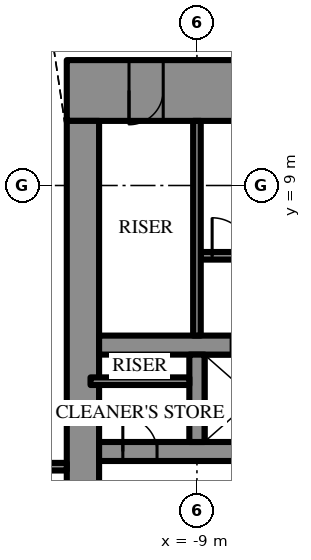
"""IFC4 building model, lengths in metres.
Left out: names, types, materials, properties, quantities, classifications, styles, units other than length and angle.
Written with IfcOpenShell. Run it as: python <this file> out.ifc"""

import sys

from ifc_helpers import new_model, si_unit, direction, frame, frame_2d, origin, place, context, subcontext, project, spatial, rectangle, extrude, element, fill, save


model = new_model("IFC4")
c1 = context("Model", 3, precision=1e-05, world=origin(), true_north=direction((0.0, 1.0)))
c2 = subcontext(c1, "Body", "Model", "MODEL_VIEW")
j1 = project(units=[si_unit("LENGTHUNIT", "METRE"), si_unit("PLANEANGLEUNIT", "RADIAN")], contexts=[c1])
p1 = place(None, origin())
s1 = spatial("IfcSite", under=j1, at=p1, CompositionType="ELEMENT")
p2 = place(p1, origin())
s2 = spatial("IfcBuilding", under=s1, at=p2, CompositionType="ELEMENT")
p3 = place(p2, frame((0.0, 0.0, 387.1)))
s3 = spatial("IfcBuildingStorey", under=s2, at=p3, CompositionType="ELEMENT", Elevation=387.1)
p4 = place(p3, frame((-12.425, 11.5, 0.0), z_axis=(0.0, 0.0, 1.0), x_axis=(1.0, 0.0, 0.0)))
e1 = element("IfcWall", 1, at=p4, inside=s3, PredefinedType="SHEAR", context=c2, shape_type="SweptSolid", body=[
    extrude(rectangle(XDim=24.85, YDim=1.6, at=frame_2d((12.425, 0.0))), origin(), (0.0, 0.0, 1.0), 4.2),
])
p5 = place(p4, frame((13.275, 0.0, 0.0)))
e2 = element("IfcOpeningElement", 2, at=p5, cuts=e1, PredefinedType="OPENING", context=c2, shape_type="SweptSolid", body=[
    extrude(rectangle(XDim=0.9, YDim=2.2, at=frame_2d((0.45, 1.1))), frame((0.0, 0.81, 0.0), z_axis=(0.0, -1.0, 0.0), x_axis=(1.0, 0.0, 0.0)), (0.0, 0.0, 1.0), 1.62),
])
p6 = place(p4, frame((16.275, 0.0, 0.0)))
e3 = element("IfcOpeningElement", 3, at=p6, cuts=e1, PredefinedType="OPENING", context=c2, shape_type="SweptSolid", body=[
    extrude(rectangle(XDim=0.9, YDim=2.2, at=frame_2d((0.45, 1.1))), frame((0.0, 0.81, 0.0), z_axis=(0.0, -1.0, 0.0), x_axis=(1.0, 0.0, 0.0)), (0.0, 0.0, 1.0), 1.62),
])
p7 = place(p4, frame((19.325, 0.0, 0.0)))
e4 = element("IfcOpeningElement", 4, at=p7, cuts=e1, PredefinedType="OPENING", context=c2, shape_type="SweptSolid", body=[
    extrude(rectangle(XDim=1.0, YDim=2.2, at=frame_2d((0.5, 1.1))), frame((0.0, 0.81, 0.0), z_axis=(0.0, -1.0, 0.0), x_axis=(1.0, 0.0, 0.0)), (0.0, 0.0, 1.0), 1.62),
])
p8 = place(p4, frame((1.637, 0.0, 0.0)))
e5 = element("IfcOpeningElement", 5, at=p8, cuts=e1, PredefinedType="OPENING", context=c2, shape_type="SweptSolid", body=[
    extrude(rectangle(XDim=0.9, YDim=2.2, at=frame_2d((0.45, 1.1))), frame((0.0, 0.81, 0.0), z_axis=(0.0, -1.0, 0.0), x_axis=(1.0, 0.0, 0.0)), (0.0, 0.0, 1.0), 1.62),
])
p9 = place(p4, frame((22.312, 0.0, 0.0)))
e6 = element("IfcOpeningElement", 6, at=p9, cuts=e1, PredefinedType="OPENING", context=c2, shape_type="SweptSolid", body=[
    extrude(rectangle(XDim=0.9, YDim=2.2, at=frame_2d((0.45, 1.1))), frame((0.0, 0.81, 0.0), z_axis=(0.0, -1.0, 0.0), x_axis=(1.0, 0.0, 0.0)), (0.0, 0.0, 1.0), 1.62),
])
p10 = place(p3, frame((-12.0, 10.7, 0.0), z_axis=(0.0, 0.0, 1.0), x_axis=(0.0, -1.0, 0.0)))
e7 = element("IfcWall", 7, at=p10, inside=s3, PredefinedType="SHEAR", context=c2, shape_type="SweptSolid", body=[
    extrude(rectangle(XDim=21.4, YDim=0.85, at=frame_2d((10.7, 0.0))), origin(), (0.0, 0.0, 1.0), 4.2),
])
p11 = place(p10, frame((9.8, 0.0, 0.0)))
e8 = element("IfcOpeningElement", 8, at=p11, cuts=e7, PredefinedType="OPENING", context=c2, shape_type="SweptSolid", body=[
    extrude(rectangle(XDim=1.8, YDim=2.4, at=frame_2d((0.9, 1.2))), frame((0.0, 0.435, 0.0), z_axis=(0.0, -1.0, 0.0), x_axis=(1.0, 0.0, 0.0)), (0.0, 0.0, 1.0), 0.87),
])
p12 = place(p3, frame((-11.575, 2.0, 0.0), z_axis=(0.0, 0.0, 1.0), x_axis=(1.0, 0.0, 0.0)))
e9 = element("IfcWall", 9, at=p12, inside=s3, PredefinedType="SHEAR", context=c2, shape_type="SweptSolid", body=[
    extrude(rectangle(XDim=5.775, YDim=0.5, at=frame_2d((2.887, 0.0))), origin(), (0.0, 0.0, 1.0), 4.2),
])
p13 = place(p12, frame((0.625, 0.0, 0.0)))
e10 = element("IfcOpeningElement", 10, at=p13, cuts=e9, PredefinedType="OPENING", context=c2, shape_type="SweptSolid", body=[
    extrude(rectangle(XDim=0.9, YDim=2.2, at=frame_2d((0.45, 1.1))), frame((0.0, 0.26, 0.0), z_axis=(0.0, -1.0, 0.0), x_axis=(1.0, 0.0, 0.0)), (0.0, 0.0, 1.0), 0.52),
])
p14 = place(p3, frame((-11.575, 4.8, 0.0), z_axis=(0.0, 0.0, 1.0), x_axis=(1.0, 0.0, 0.0)))
e11 = element("IfcWall", 11, at=p14, inside=s3, PredefinedType="SHEAR", context=c2, shape_type="SweptSolid", body=[
    extrude(rectangle(XDim=23.15, YDim=0.5, at=frame_2d((11.575, 0.0))), origin(), (0.0, 0.0, 1.0), 4.2),
])
p15 = place(p14, frame((6.475, 0.0, 0.0)))
e12 = element("IfcOpeningElement", 12, at=p15, cuts=e11, PredefinedType="OPENING", context=c2, shape_type="SweptSolid", body=[
    extrude(rectangle(XDim=1.2, YDim=2.2, at=frame_2d((0.6, 1.1))), frame((0.0, 0.26, 0.0), z_axis=(0.0, -1.0, 0.0), x_axis=(1.0, 0.0, 0.0)), (0.0, 0.0, 1.0), 0.52),
])
p16 = place(p14, frame((3.475, 0.0, 0.0)))
e13 = element("IfcOpeningElement", 13, at=p16, cuts=e11, PredefinedType="OPENING", context=c2, shape_type="SweptSolid", body=[
    extrude(rectangle(XDim=1.2, YDim=2.2, at=frame_2d((0.6, 1.1))), frame((0.0, 0.26, 0.0), z_axis=(0.0, -1.0, 0.0), x_axis=(1.0, 0.0, 0.0)), (0.0, 0.0, 1.0), 0.52),
])
p17 = place(p3, frame((-9.0, 2.25, 0.0), z_axis=(0.0, 0.0, 1.0), x_axis=(0.0, 1.0, 0.0)))
e14 = element("IfcWall", 14, at=p17, inside=s3, PredefinedType="SHEAR", context=c2, shape_type="SweptSolid", body=[
    extrude(rectangle(XDim=2.3, YDim=0.4, at=frame_2d((1.15, 0.0))), origin(), (0.0, 0.0, 1.0), 4.2),
])
p18 = place(p3, frame((-8.9, 7.15, 0.0), z_axis=(0.0, 0.0, 1.0), x_axis=(1.0, 0.0, 0.0)))
e15 = element("IfcWall", 15, at=p18, inside=s3, PredefinedType="SHEAR", context=c2, shape_type="SweptSolid", body=[
    extrude(rectangle(XDim=8.6, YDim=0.2, at=frame_2d((4.3, 0.0))), origin(), (0.0, 0.0, 1.0), 4.2),
])
p19 = place(p18, frame((0.3, 0.0, 0.0)))
e16 = element("IfcOpeningElement", 16, at=p19, cuts=e15, PredefinedType="OPENING", context=c2, shape_type="SweptSolid", body=[
    extrude(rectangle(XDim=1.0, YDim=2.2, at=frame_2d((0.5, 1.1))), frame((0.0, 0.11, 0.0), z_axis=(0.0, -1.0, 0.0), x_axis=(1.0, 0.0, 0.0)), (0.0, 0.0, 1.0), 0.22),
])
p20 = place(p3, frame((-9.0, 5.05, 0.0), z_axis=(0.0, 0.0, 1.0), x_axis=(0.0, 1.0, 0.0)))
e17 = element("IfcWall", 17, at=p20, inside=s3, PredefinedType="PARTITIONING", context=c2, shape_type="SweptSolid", body=[
    extrude(rectangle(XDim=5.65, YDim=0.2, at=frame_2d((2.825, 0.0))), origin(), (0.0, 0.0, 1.0), 4.0),
])
p21 = place(p3, frame((-11.8, 3.85, 0.0), z_axis=(0.0, 0.0, 1.0), x_axis=(1.0, 0.0, 0.0)))
e18 = element("IfcWall", 18, at=p21, inside=s3, PredefinedType="PARTITIONING", context=c2, shape_type="SweptSolid", body=[
    extrude(rectangle(XDim=2.6, YDim=0.2, at=frame_2d((1.3, 0.0))), origin(), (0.0, 0.0, 1.0), 4.0),
])
p22 = place(p3, frame((-12.425, 1.6, 0.0), z_axis=(0.0, 0.0, 1.0), x_axis=(-1.0, 0.0, 0.0)))
e19 = element("IfcWall", 19, at=p22, inside=s3, PredefinedType="PARTITIONING", context=c2, shape_type="SweptSolid", body=[
    extrude(rectangle(XDim=16.558, YDim=0.2, at=frame_2d((8.279, 0.0))), origin(), (0.0, 0.0, 1.0), 4.0),
])
p23 = place(p22, frame((1.156, 0.0, 0.0)))
e20 = element("IfcOpeningElement", 20, at=p23, cuts=e19, PredefinedType="OPENING", context=c2, shape_type="SweptSolid", body=[
    extrude(rectangle(XDim=1.0, YDim=2.2, at=frame_2d((0.5, 1.1))), frame((0.0, 0.11, 0.0), z_axis=(0.0, -1.0, 0.0), x_axis=(1.0, 0.0, 0.0)), (0.0, 0.0, 1.0), 0.22),
])
p24 = place(p19, origin())
e21 = element("IfcDoor", 21, at=p24, inside=s3, OperationType="SINGLE_SWING_RIGHT", PredefinedType="DOOR", context=c2, shape_type="SweptSolid", body=[
    extrude(rectangle(XDim=1.0, YDim=2.2, at=frame_2d((0.5, 1.1))), frame((0.0, 0.025, 0.0), z_axis=(0.0, -1.0, 0.0), x_axis=(1.0, 0.0, 0.0)), (0.0, 0.0, 1.0), 0.05),
])
fill(e16, e21)
p25 = place(p8, frame((0.9, 0.0, 0.0), z_axis=(0.0, 0.0, 1.0), x_axis=(-1.0, 0.0, 0.0)))
e22 = element("IfcDoor", 22, at=p25, inside=s3, OperationType="SINGLE_SWING_LEFT", PredefinedType="DOOR", context=c2, shape_type="SweptSolid", body=[
    extrude(rectangle(XDim=0.9, YDim=2.2, at=frame_2d((0.45, 1.1))), frame((0.0, 0.025, 0.0), z_axis=(0.0, -1.0, 0.0), x_axis=(1.0, 0.0, 0.0)), (0.0, 0.0, 1.0), 0.05),
])
fill(e5, e22)
p26 = place(p13, origin())
e23 = element("IfcDoor", 23, at=p26, inside=s3, OperationType="SINGLE_SWING_RIGHT", PredefinedType="DOOR", context=c2, shape_type="SweptSolid", body=[
    extrude(rectangle(XDim=0.9, YDim=2.2, at=frame_2d((0.45, 1.1))), frame((0.0, 0.025, 0.0), z_axis=(0.0, -1.0, 0.0), x_axis=(1.0, 0.0, 0.0)), (0.0, 0.0, 1.0), 0.05),
])
fill(e10, e23)
save(model, sys.argv[1])
